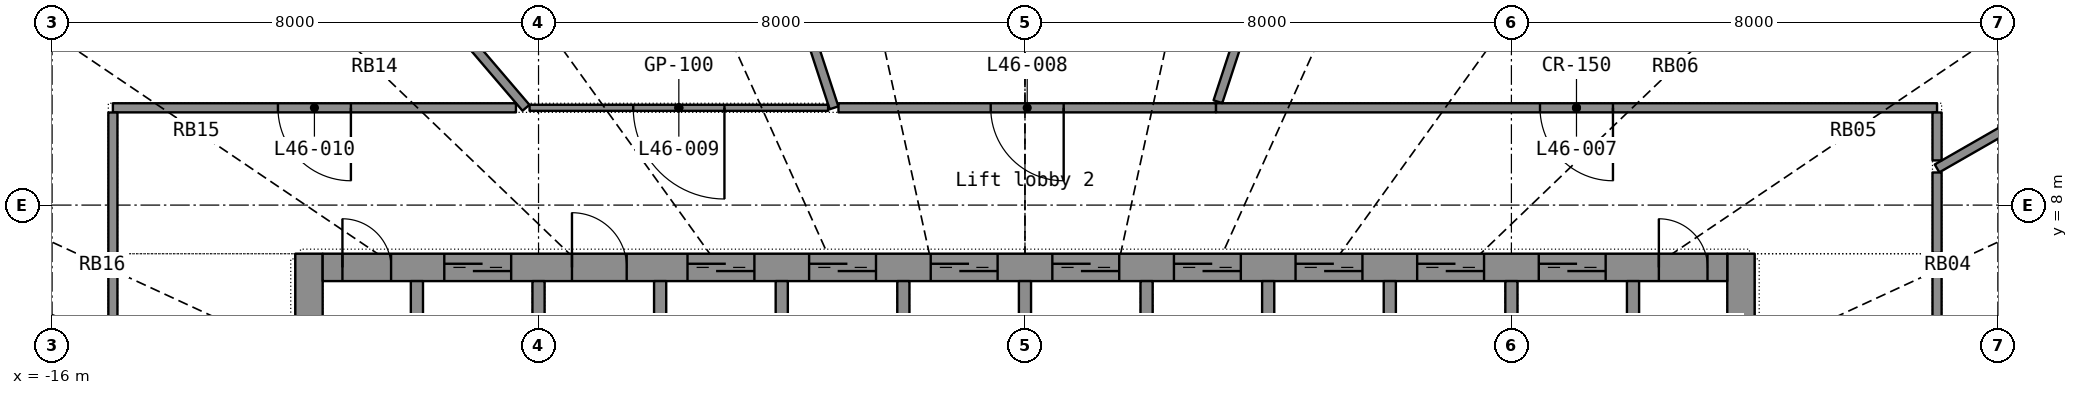
"""IFC4 building model, lengths in metres.
Left out: names, types, materials, properties, quantities, classifications, styles, units other than length and angle.
Written with IfcOpenShell. Run it as: python <this file> out.ifc"""

import sys

from ifc_helpers import new_model, si_unit, direction, frame, frame_2d, origin, place, context, subcontext, project, spatial, rectangle, extrude, element, fill, save


model = new_model("IFC4")
c1 = context("Model", 3, precision=1e-05, world=origin(), true_north=direction((0.0, 1.0)))
c2 = subcontext(c1, "Body", "Model", "MODEL_VIEW")
j1 = project(units=[si_unit("LENGTHUNIT", "METRE"), si_unit("PLANEANGLEUNIT", "RADIAN")], contexts=[c1])
p1 = place(None, origin())
s1 = spatial("IfcSite", under=j1, at=p1, CompositionType="ELEMENT")
p2 = place(p1, origin())
s2 = spatial("IfcBuilding", under=s1, at=p2, CompositionType="ELEMENT")
p3 = place(p2, frame((0.0, 0.0, 190.4)))
s3 = spatial("IfcBuildingStorey", under=s2, at=p3, CompositionType="ELEMENT", Elevation=190.4)
p4 = place(p3, frame((-11.775, -7.2, 0.0), z_axis=(0.0, 0.0, 1.0), x_axis=(0.0, 1.0, 0.0)))
e1 = element("IfcWall", 1, at=p4, inside=s3, PredefinedType="SHEAR", context=c2, shape_type="SweptSolid", body=[
    extrude(rectangle(XDim=14.4, YDim=0.45, at=frame_2d((7.2, 0.0))), origin(), (0.0, 0.0, 1.0), 3.3),
])
p5 = place(p4, frame((6.5, 0.0, 0.0)))
e2 = element("IfcOpeningElement", 2, at=p5, cuts=e1, PredefinedType="OPENING", context=c2, shape_type="SweptSolid", body=[
    extrude(rectangle(XDim=1.4, YDim=2.2, at=frame_2d((0.7, 1.1))), frame((0.0, 0.235, 0.0), z_axis=(0.0, -1.0, 0.0), x_axis=(1.0, 0.0, 0.0)), (0.0, 0.0, 1.0), 0.47),
])
p6 = place(p3, frame((11.775, -7.2, 0.0), z_axis=(0.0, 0.0, 1.0), x_axis=(0.0, 1.0, 0.0)))
e3 = element("IfcWall", 3, at=p6, inside=s3, PredefinedType="SHEAR", context=c2, shape_type="SweptSolid", body=[
    extrude(rectangle(XDim=14.4, YDim=0.45, at=frame_2d((7.2, 0.0))), origin(), (0.0, 0.0, 1.0), 3.3),
])
p7 = place(p6, frame((6.5, 0.0, 0.0)))
e4 = element("IfcOpeningElement", 4, at=p7, cuts=e3, PredefinedType="OPENING", context=c2, shape_type="SweptSolid", body=[
    extrude(rectangle(XDim=1.4, YDim=2.2, at=frame_2d((0.7, 1.1))), frame((0.0, 0.235, 0.0), z_axis=(0.0, -1.0, 0.0), x_axis=(1.0, 0.0, 0.0)), (0.0, 0.0, 1.0), 0.47),
])
p8 = place(p3, frame((-11.55, 6.975, 0.0), z_axis=(0.0, 0.0, 1.0), x_axis=(1.0, 0.0, 0.0)))
e5 = element("IfcWall", 5, at=p8, inside=s3, PredefinedType="SHEAR", context=c2, shape_type="SweptSolid", body=[
    extrude(rectangle(XDim=23.1, YDim=0.45, at=frame_2d((11.55, 0.0))), origin(), (0.0, 0.0, 1.0), 3.3),
])
p9 = place(p8, frame((2.0, 0.0, 0.0)))
e6 = element("IfcOpeningElement", 6, at=p9, cuts=e5, PredefinedType="OPENING", context=c2, shape_type="SweptSolid", body=[
    extrude(rectangle(XDim=1.1, YDim=2.2, at=frame_2d((0.55, 1.1))), frame((0.0, 0.235, 0.0), z_axis=(0.0, -1.0, 0.0), x_axis=(1.0, 0.0, 0.0)), (0.0, 0.0, 1.0), 0.47),
])
p10 = place(p8, frame((6.0, 0.0, 0.0)))
e7 = element("IfcOpeningElement", 7, at=p10, cuts=e5, PredefinedType="OPENING", context=c2, shape_type="SweptSolid", body=[
    extrude(rectangle(XDim=1.1, YDim=2.2, at=frame_2d((0.55, 1.1))), frame((0.0, 0.235, 0.0), z_axis=(0.0, -1.0, 0.0), x_axis=(1.0, 0.0, 0.0)), (0.0, 0.0, 1.0), 0.47),
])
p11 = place(p8, frame((8.0, 0.0, 0.0)))
e8 = element("IfcOpeningElement", 8, at=p11, cuts=e5, PredefinedType="OPENING", context=c2, shape_type="SweptSolid", body=[
    extrude(rectangle(XDim=1.1, YDim=2.2, at=frame_2d((0.55, 1.1))), frame((0.0, 0.235, 0.0), z_axis=(0.0, -1.0, 0.0), x_axis=(1.0, 0.0, 0.0)), (0.0, 0.0, 1.0), 0.47),
])
p12 = place(p8, frame((10.0, 0.0, 0.0)))
e9 = element("IfcOpeningElement", 9, at=p12, cuts=e5, PredefinedType="OPENING", context=c2, shape_type="SweptSolid", body=[
    extrude(rectangle(XDim=1.1, YDim=2.2, at=frame_2d((0.55, 1.1))), frame((0.0, 0.235, 0.0), z_axis=(0.0, -1.0, 0.0), x_axis=(1.0, 0.0, 0.0)), (0.0, 0.0, 1.0), 0.47),
])
p13 = place(p8, frame((12.0, 0.0, 0.0)))
e10 = element("IfcOpeningElement", 10, at=p13, cuts=e5, PredefinedType="OPENING", context=c2, shape_type="SweptSolid", body=[
    extrude(rectangle(XDim=1.1, YDim=2.2, at=frame_2d((0.55, 1.1))), frame((0.0, 0.235, 0.0), z_axis=(0.0, -1.0, 0.0), x_axis=(1.0, 0.0, 0.0)), (0.0, 0.0, 1.0), 0.47),
])
p14 = place(p8, frame((14.0, 0.0, 0.0)))
e11 = element("IfcOpeningElement", 11, at=p14, cuts=e5, PredefinedType="OPENING", context=c2, shape_type="SweptSolid", body=[
    extrude(rectangle(XDim=1.1, YDim=2.2, at=frame_2d((0.55, 1.1))), frame((0.0, 0.235, 0.0), z_axis=(0.0, -1.0, 0.0), x_axis=(1.0, 0.0, 0.0)), (0.0, 0.0, 1.0), 0.47),
])
p15 = place(p8, frame((16.0, 0.0, 0.0)))
e12 = element("IfcOpeningElement", 12, at=p15, cuts=e5, PredefinedType="OPENING", context=c2, shape_type="SweptSolid", body=[
    extrude(rectangle(XDim=1.1, YDim=2.2, at=frame_2d((0.55, 1.1))), frame((0.0, 0.235, 0.0), z_axis=(0.0, -1.0, 0.0), x_axis=(1.0, 0.0, 0.0)), (0.0, 0.0, 1.0), 0.47),
])
p16 = place(p8, frame((18.0, 0.0, 0.0)))
e13 = element("IfcOpeningElement", 13, at=p16, cuts=e5, PredefinedType="OPENING", context=c2, shape_type="SweptSolid", body=[
    extrude(rectangle(XDim=1.1, YDim=2.2, at=frame_2d((0.55, 1.1))), frame((0.0, 0.235, 0.0), z_axis=(0.0, -1.0, 0.0), x_axis=(1.0, 0.0, 0.0)), (0.0, 0.0, 1.0), 0.47),
])
p17 = place(p8, frame((20.0, 0.0, 0.0)))
e14 = element("IfcOpeningElement", 14, at=p17, cuts=e5, PredefinedType="OPENING", context=c2, shape_type="SweptSolid", body=[
    extrude(rectangle(XDim=1.1, YDim=2.2, at=frame_2d((0.55, 1.1))), frame((0.0, 0.235, 0.0), z_axis=(0.0, -1.0, 0.0), x_axis=(1.0, 0.0, 0.0)), (0.0, 0.0, 1.0), 0.47),
])
p18 = place(p8, frame((4.1, 0.0, 0.0)))
e15 = element("IfcOpeningElement", 15, at=p18, cuts=e5, PredefinedType="OPENING", context=c2, shape_type="SweptSolid", body=[
    extrude(rectangle(XDim=0.9, YDim=2.1, at=frame_2d((0.45, 1.05))), frame((0.0, 0.235, 0.0), z_axis=(0.0, -1.0, 0.0), x_axis=(1.0, 0.0, 0.0)), (0.0, 0.0, 1.0), 0.47),
])
p19 = place(p8, frame((0.325, 0.0, 0.0)))
e16 = element("IfcOpeningElement", 16, at=p19, cuts=e5, PredefinedType="OPENING", context=c2, shape_type="SweptSolid", body=[
    extrude(rectangle(XDim=0.8, YDim=2.05, at=frame_2d((0.4, 1.025))), frame((0.0, 0.235, 0.0), z_axis=(0.0, -1.0, 0.0), x_axis=(1.0, 0.0, 0.0)), (0.0, 0.0, 1.0), 0.47),
])
p20 = place(p8, frame((21.975, 0.0, 0.0)))
e17 = element("IfcOpeningElement", 17, at=p20, cuts=e5, PredefinedType="OPENING", context=c2, shape_type="SweptSolid", body=[
    extrude(rectangle(XDim=0.8, YDim=2.05, at=frame_2d((0.4, 1.025))), frame((0.0, 0.235, 0.0), z_axis=(0.0, -1.0, 0.0), x_axis=(1.0, 0.0, 0.0)), (0.0, 0.0, 1.0), 0.47),
])
for number, where, z_axis, x_axis in (
    (18, (-10.0, 3.9, 0.0), (0.0, 0.0, 1.0), (0.0, 1.0, 0.0)),
    (19, (-8.0, 3.9, 0.0), (0.0, 0.0, 1.0), (0.0, 1.0, 0.0)),
    (20, (-6.0, 3.9, 0.0), (0.0, 0.0, 1.0), (0.0, 1.0, 0.0)),
    (21, (-4.0, 3.9, 0.0), (0.0, 0.0, 1.0), (0.0, 1.0, 0.0)),
    (22, (-2.0, 3.9, 0.0), (0.0, 0.0, 1.0), (0.0, 1.0, 0.0)),
    (23, (0.0, 3.9, 0.0), (0.0, 0.0, 1.0), (0.0, 1.0, 0.0)),
    (24, (2.0, 3.9, 0.0), (0.0, 0.0, 1.0), (0.0, 1.0, 0.0)),
    (25, (4.0, 3.9, 0.0), (0.0, 0.0, 1.0), (0.0, 1.0, 0.0)),
    (26, (6.0, 3.9, 0.0), (0.0, 0.0, 1.0), (0.0, 1.0, 0.0)),
    (27, (8.0, 3.9, 0.0), (0.0, 0.0, 1.0), (0.0, 1.0, 0.0)),
    (28, (10.0, 3.9, 0.0), (0.0, 0.0, 1.0), (0.0, 1.0, 0.0)),
):
    element("IfcWall", number, at=place(p3, frame(where, z_axis=z_axis, x_axis=x_axis)), inside=s3, PredefinedType="SHEAR", context=c2, shape_type="SweptSolid", body=[
        extrude(rectangle(XDim=2.85, YDim=0.2, at=frame_2d((1.425, 0.0))), origin(), (0.0, 0.0, 1.0), 3.3),
    ])
p21 = place(p3, frame((15.0, 9.6, 0.0), z_axis=(0.0, 0.0, 1.0), x_axis=(-1.0, 0.0, 0.0)))
e29 = element("IfcWall", 29, at=p21, inside=s3, PredefinedType="PARTITIONING", context=c2, shape_type="SweptSolid", body=[
    extrude(rectangle(XDim=11.86, YDim=0.15, at=frame_2d((5.93, 0.0))), origin(), (0.0, 0.0, 1.0), 2.4),
])
p22 = place(p21, frame((5.33, 0.0, 0.0)))
e30 = element("IfcOpeningElement", 30, at=p22, cuts=e29, PredefinedType="OPENING", context=c2, shape_type="SweptSolid", body=[
    extrude(rectangle(XDim=1.2, YDim=2.2, at=frame_2d((0.6, 1.1))), frame((0.0, 0.085, 0.0), z_axis=(0.0, -1.0, 0.0), x_axis=(1.0, 0.0, 0.0)), (0.0, 0.0, 1.0), 0.17),
])
p23 = place(p3, frame((-5.854, 17.894, 0.0), z_axis=(0.0, 0.0, 1.0), x_axis=(0.310918216, -0.95043667, 0.0)))
e31 = element("IfcWall", 31, at=p23, inside=s3, PredefinedType="PARTITIONING", context=c2, shape_type="SweptSolid", body=[
    extrude(rectangle(XDim=8.726, YDim=0.15, at=frame_2d((4.363, 0.0))), origin(), (0.0, 0.0, 1.0), 2.4),
])
p24 = place(p3, frame((5.853, 17.893, 0.0), z_axis=(0.0, 0.0, 1.0), x_axis=(-0.310929285, -0.950433049, 0.0)))
e32 = element("IfcWall", 32, at=p24, inside=s3, PredefinedType="PARTITIONING", context=c2, shape_type="SweptSolid", body=[
    extrude(rectangle(XDim=8.62, YDim=0.15, at=frame_2d((4.31, 0.0))), origin(), (0.0, 0.0, 1.0), 2.4),
])
p25 = place(p3, frame((-12.976, 15.179, 0.0), z_axis=(0.0, 0.0, 1.0), x_axis=(0.649788278, -0.76011525, 0.0)))
e33 = element("IfcWall", 33, at=p25, inside=s3, PredefinedType="PARTITIONING", context=c2, shape_type="SweptSolid", body=[
    extrude(rectangle(XDim=7.34, YDim=0.15, at=frame_2d((3.67, 0.0))), origin(), (0.0, 0.0, 1.0), 2.4),
])
p26 = place(p3, frame((-8.371, 9.6, 0.0), z_axis=(0.0, 0.0, 1.0), x_axis=(-1.0, 0.0, 0.0)))
e34 = element("IfcWall", 34, at=p26, inside=s3, PredefinedType="PARTITIONING", context=c2, shape_type="SweptSolid", body=[
    extrude(rectangle(XDim=6.629, YDim=0.15, at=frame_2d((3.314, 0.0))), origin(), (0.0, 0.0, 1.0), 2.4),
])
p27 = place(p26, frame((2.714, 0.0, 0.0)))
e35 = element("IfcOpeningElement", 35, at=p27, cuts=e34, PredefinedType="OPENING", context=c2, shape_type="SweptSolid", body=[
    extrude(rectangle(XDim=1.2, YDim=2.2, at=frame_2d((0.6, 1.1))), frame((0.0, 0.085, 0.0), z_axis=(0.0, -1.0, 0.0), x_axis=(1.0, 0.0, 0.0)), (0.0, 0.0, 1.0), 0.17),
])
p28 = place(p3, frame((3.14, 9.6, 0.0), z_axis=(0.0, 0.0, 1.0), x_axis=(-1.0, 0.0, 0.0)))
e36 = element("IfcWall", 36, at=p28, inside=s3, PredefinedType="PARTITIONING", context=c2, shape_type="SweptSolid", body=[
    extrude(rectangle(XDim=6.208, YDim=0.15, at=frame_2d((3.104, 0.0))), origin(), (0.0, 0.0, 1.0), 2.4),
])
p29 = place(p28, frame((2.504, 0.0, 0.0)))
e37 = element("IfcOpeningElement", 37, at=p29, cuts=e36, PredefinedType="OPENING", context=c2, shape_type="SweptSolid", body=[
    extrude(rectangle(XDim=1.2, YDim=2.2, at=frame_2d((0.6, 1.1))), frame((0.0, 0.085, 0.0), z_axis=(0.0, -1.0, 0.0), x_axis=(1.0, 0.0, 0.0)), (0.0, 0.0, 1.0), 0.17),
])
p30 = place(p3, frame((-20.515, 7.836, 0.0), z_axis=(0.0, 0.0, 1.0), x_axis=(0.934186062, -0.356786213, 0.0)))
e38 = element("IfcWall", 38, at=p30, inside=s3, PredefinedType="PARTITIONING", context=c2, shape_type="SweptSolid", body=[
    extrude(rectangle(XDim=5.904, YDim=0.15, at=frame_2d((2.952, 0.0))), origin(), (0.0, 0.0, 1.0), 2.4),
])
p31 = place(p3, frame((15.0, 1.8, 0.0), z_axis=(0.0, 0.0, 1.0), x_axis=(0.0, 1.0, 0.0)))
e39 = element("IfcWall", 39, at=p31, inside=s3, PredefinedType="PARTITIONING", context=c2, shape_type="SweptSolid", body=[
    extrude(rectangle(XDim=5.412, YDim=0.15, at=frame_2d((2.706, 0.0))), origin(), (0.0, 0.0, 1.0), 2.4),
])
p32 = place(p31, frame((2.106, 0.0, 0.0)))
e40 = element("IfcOpeningElement", 40, at=p32, cuts=e39, PredefinedType="OPENING", context=c2, shape_type="SweptSolid", body=[
    extrude(rectangle(XDim=1.2, YDim=2.2, at=frame_2d((0.6, 1.1))), frame((0.0, 0.085, 0.0), z_axis=(0.0, -1.0, 0.0), x_axis=(1.0, 0.0, 0.0)), (0.0, 0.0, 1.0), 0.17),
])
p33 = place(p3, frame((-3.238, 9.6, 0.0), z_axis=(0.0, 0.0, 1.0), x_axis=(-1.0, 0.0, 0.0)))
e41 = element("IfcWall", 41, at=p33, inside=s3, PredefinedType="PARTITIONING", context=c2, shape_type="SweptSolid", body=[
    extrude(rectangle(XDim=4.91, YDim=0.1, at=frame_2d((2.455, 0.0))), origin(), (0.0, 0.0, 1.0), 2.4),
])
p34 = place(p33, frame((1.705, 0.0, 0.0)))
e42 = element("IfcOpeningElement", 42, at=p34, cuts=e41, PredefinedType="OPENING", context=c2, shape_type="SweptSolid", body=[
    extrude(rectangle(XDim=1.5, YDim=2.4, at=frame_2d((0.75, 1.2))), frame((0.0, 0.06, 0.0), z_axis=(0.0, -1.0, 0.0), x_axis=(1.0, 0.0, 0.0)), (0.0, 0.0, 1.0), 0.12),
])
p35 = place(p3, frame((18.537, 10.632, 0.0), z_axis=(0.0, 0.0, 1.0), x_axis=(-0.867438786, -0.49754392, 0.0)))
e43 = element("IfcWall", 43, at=p35, inside=s3, PredefinedType="PARTITIONING", context=c2, shape_type="SweptSolid", body=[
    extrude(rectangle(XDim=4.078, YDim=0.15, at=frame_2d((2.039, 0.0))), origin(), (0.0, 0.0, 1.0), 2.4),
])
p36 = place(p3, frame((-15.0, 9.523, 0.0), z_axis=(0.0, 0.0, 1.0), x_axis=(0.0, -1.0, 0.0)))
e44 = element("IfcWall", 44, at=p36, inside=s3, PredefinedType="PARTITIONING", context=c2, shape_type="SweptSolid", body=[
    extrude(rectangle(XDim=2.335, YDim=0.15, at=frame_2d((1.167, 0.0))), origin(), (0.0, 0.0, 1.0), 2.4),
])
p37 = place(p3, frame((-15.0, 7.187, 0.0), z_axis=(0.0, 0.0, 1.0), x_axis=(0.0, -1.0, 0.0)))
e45 = element("IfcWall", 45, at=p37, inside=s3, PredefinedType="PARTITIONING", context=c2, shape_type="SweptSolid", body=[
    extrude(rectangle(XDim=1.347, YDim=0.15, at=frame_2d((0.673, 0.0))), origin(), (0.0, 0.0, 1.0), 2.4),
])
p38 = place(p3, frame((15.0, 7.213, 0.0), z_axis=(0.0, 0.0, 1.0), x_axis=(0.0, 1.0, 0.0)))
e46 = element("IfcWall", 46, at=p38, inside=s3, PredefinedType="PARTITIONING", context=c2, shape_type="SweptSolid", body=[
    extrude(rectangle(XDim=1.323, YDim=0.15, at=frame_2d((0.662, 0.0))), origin(), (0.0, 0.0, 1.0), 2.4),
])
p39 = place(p3, frame((15.0, 8.735, 0.0), z_axis=(0.0, 0.0, 1.0), x_axis=(0.0, 1.0, 0.0)))
e47 = element("IfcWall", 47, at=p39, inside=s3, PredefinedType="PARTITIONING", context=c2, shape_type="SweptSolid", body=[
    extrude(rectangle(XDim=0.788, YDim=0.15, at=frame_2d((0.394, 0.0))), origin(), (0.0, 0.0, 1.0), 2.4),
])
p40 = place(p9, origin())
e48 = element("IfcDoor", 48, at=p40, inside=s3, OperationType="DOUBLE_DOOR_SLIDING", PredefinedType="DOOR", context=c2, shape_type="SweptSolid", body=[
    extrude(rectangle(XDim=1.1, YDim=2.2, at=frame_2d((0.55, 1.1))), frame((0.0, 0.025, 0.0), z_axis=(0.0, -1.0, 0.0), x_axis=(1.0, 0.0, 0.0)), (0.0, 0.0, 1.0), 0.05),
])
fill(e6, e48)
p41 = place(p10, origin())
e49 = element("IfcDoor", 49, at=p41, inside=s3, OperationType="DOUBLE_DOOR_SLIDING", PredefinedType="DOOR", context=c2, shape_type="SweptSolid", body=[
    extrude(rectangle(XDim=1.1, YDim=2.2, at=frame_2d((0.55, 1.1))), frame((0.0, 0.025, 0.0), z_axis=(0.0, -1.0, 0.0), x_axis=(1.0, 0.0, 0.0)), (0.0, 0.0, 1.0), 0.05),
])
fill(e7, e49)
p42 = place(p11, origin())
e50 = element("IfcDoor", 50, at=p42, inside=s3, OperationType="DOUBLE_DOOR_SLIDING", PredefinedType="DOOR", context=c2, shape_type="SweptSolid", body=[
    extrude(rectangle(XDim=1.1, YDim=2.2, at=frame_2d((0.55, 1.1))), frame((0.0, 0.025, 0.0), z_axis=(0.0, -1.0, 0.0), x_axis=(1.0, 0.0, 0.0)), (0.0, 0.0, 1.0), 0.05),
])
fill(e8, e50)
p43 = place(p12, origin())
e51 = element("IfcDoor", 51, at=p43, inside=s3, OperationType="DOUBLE_DOOR_SLIDING", PredefinedType="DOOR", context=c2, shape_type="SweptSolid", body=[
    extrude(rectangle(XDim=1.1, YDim=2.2, at=frame_2d((0.55, 1.1))), frame((0.0, 0.025, 0.0), z_axis=(0.0, -1.0, 0.0), x_axis=(1.0, 0.0, 0.0)), (0.0, 0.0, 1.0), 0.05),
])
fill(e9, e51)
p44 = place(p13, origin())
e52 = element("IfcDoor", 52, at=p44, inside=s3, OperationType="DOUBLE_DOOR_SLIDING", PredefinedType="DOOR", context=c2, shape_type="SweptSolid", body=[
    extrude(rectangle(XDim=1.1, YDim=2.2, at=frame_2d((0.55, 1.1))), frame((0.0, 0.025, 0.0), z_axis=(0.0, -1.0, 0.0), x_axis=(1.0, 0.0, 0.0)), (0.0, 0.0, 1.0), 0.05),
])
fill(e10, e52)
p45 = place(p14, origin())
e53 = element("IfcDoor", 53, at=p45, inside=s3, OperationType="DOUBLE_DOOR_SLIDING", PredefinedType="DOOR", context=c2, shape_type="SweptSolid", body=[
    extrude(rectangle(XDim=1.1, YDim=2.2, at=frame_2d((0.55, 1.1))), frame((0.0, 0.025, 0.0), z_axis=(0.0, -1.0, 0.0), x_axis=(1.0, 0.0, 0.0)), (0.0, 0.0, 1.0), 0.05),
])
fill(e11, e53)
p46 = place(p15, origin())
e54 = element("IfcDoor", 54, at=p46, inside=s3, OperationType="DOUBLE_DOOR_SLIDING", PredefinedType="DOOR", context=c2, shape_type="SweptSolid", body=[
    extrude(rectangle(XDim=1.1, YDim=2.2, at=frame_2d((0.55, 1.1))), frame((0.0, 0.025, 0.0), z_axis=(0.0, -1.0, 0.0), x_axis=(1.0, 0.0, 0.0)), (0.0, 0.0, 1.0), 0.05),
])
fill(e12, e54)
p47 = place(p16, origin())
e55 = element("IfcDoor", 55, at=p47, inside=s3, OperationType="DOUBLE_DOOR_SLIDING", PredefinedType="DOOR", context=c2, shape_type="SweptSolid", body=[
    extrude(rectangle(XDim=1.1, YDim=2.2, at=frame_2d((0.55, 1.1))), frame((0.0, 0.025, 0.0), z_axis=(0.0, -1.0, 0.0), x_axis=(1.0, 0.0, 0.0)), (0.0, 0.0, 1.0), 0.05),
])
fill(e13, e55)
p48 = place(p17, origin())
e56 = element("IfcDoor", 56, at=p48, inside=s3, OperationType="DOUBLE_DOOR_SLIDING", PredefinedType="DOOR", context=c2, shape_type="SweptSolid", body=[
    extrude(rectangle(XDim=1.1, YDim=2.2, at=frame_2d((0.55, 1.1))), frame((0.0, 0.025, 0.0), z_axis=(0.0, -1.0, 0.0), x_axis=(1.0, 0.0, 0.0)), (0.0, 0.0, 1.0), 0.05),
])
fill(e14, e56)
p49 = place(p18, origin())
e57 = element("IfcDoor", 57, at=p49, inside=s3, OperationType="SINGLE_SWING_LEFT", PredefinedType="DOOR", context=c2, shape_type="SweptSolid", body=[
    extrude(rectangle(XDim=0.9, YDim=2.1, at=frame_2d((0.45, 1.05))), frame((0.0, 0.025, 0.0), z_axis=(0.0, -1.0, 0.0), x_axis=(1.0, 0.0, 0.0)), (0.0, 0.0, 1.0), 0.05),
])
fill(e15, e57)
p50 = place(p19, origin())
e58 = element("IfcDoor", 58, at=p50, inside=s3, OperationType="SINGLE_SWING_LEFT", PredefinedType="DOOR", context=c2, shape_type="SweptSolid", body=[
    extrude(rectangle(XDim=0.8, YDim=2.05, at=frame_2d((0.4, 1.025))), frame((0.0, 0.025, 0.0), z_axis=(0.0, -1.0, 0.0), x_axis=(1.0, 0.0, 0.0)), (0.0, 0.0, 1.0), 0.05),
])
fill(e16, e58)
p51 = place(p20, origin())
e59 = element("IfcDoor", 59, at=p51, inside=s3, OperationType="SINGLE_SWING_LEFT", PredefinedType="DOOR", context=c2, shape_type="SweptSolid", body=[
    extrude(rectangle(XDim=0.8, YDim=2.05, at=frame_2d((0.4, 1.025))), frame((0.0, 0.025, 0.0), z_axis=(0.0, -1.0, 0.0), x_axis=(1.0, 0.0, 0.0)), (0.0, 0.0, 1.0), 0.05),
])
fill(e17, e59)
p52 = place(p22, origin())
e60 = element("IfcDoor", 60, at=p52, inside=s3, OperationType="DOUBLE_DOOR_SINGLE_SWING", PredefinedType="DOOR", context=c2, shape_type="SweptSolid", body=[
    extrude(rectangle(XDim=1.2, YDim=2.2, at=frame_2d((0.6, 1.1))), frame((0.0, 0.025, 0.0), z_axis=(0.0, -1.0, 0.0), x_axis=(1.0, 0.0, 0.0)), (0.0, 0.0, 1.0), 0.05),
])
fill(e30, e60)
p53 = place(p29, origin())
e61 = element("IfcDoor", 61, at=p53, inside=s3, OperationType="DOUBLE_DOOR_SINGLE_SWING", PredefinedType="DOOR", context=c2, shape_type="SweptSolid", body=[
    extrude(rectangle(XDim=1.2, YDim=2.2, at=frame_2d((0.6, 1.1))), frame((0.0, 0.025, 0.0), z_axis=(0.0, -1.0, 0.0), x_axis=(1.0, 0.0, 0.0)), (0.0, 0.0, 1.0), 0.05),
])
fill(e37, e61)
p54 = place(p34, origin())
e62 = element("IfcDoor", 62, at=p54, inside=s3, OperationType="DOUBLE_DOOR_SINGLE_SWING", PredefinedType="DOOR", context=c2, shape_type="SweptSolid", body=[
    extrude(rectangle(XDim=1.5, YDim=2.4, at=frame_2d((0.75, 1.2))), frame((0.0, 0.025, 0.0), z_axis=(0.0, -1.0, 0.0), x_axis=(1.0, 0.0, 0.0)), (0.0, 0.0, 1.0), 0.05),
])
fill(e42, e62)
p55 = place(p27, origin())
e63 = element("IfcDoor", 63, at=p55, inside=s3, OperationType="DOUBLE_DOOR_SINGLE_SWING", PredefinedType="DOOR", context=c2, shape_type="SweptSolid", body=[
    extrude(rectangle(XDim=1.2, YDim=2.2, at=frame_2d((0.6, 1.1))), frame((0.0, 0.025, 0.0), z_axis=(0.0, -1.0, 0.0), x_axis=(1.0, 0.0, 0.0)), (0.0, 0.0, 1.0), 0.05),
])
fill(e35, e63)
save(model, sys.argv[1])
